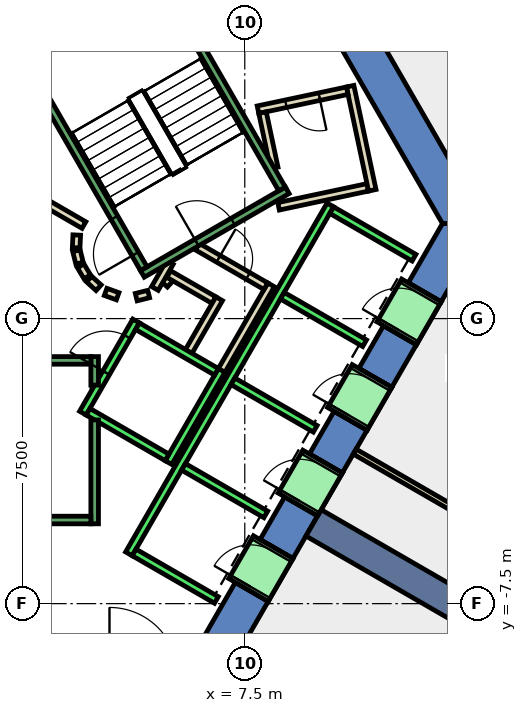
"""IFC4 building model, lengths in metres.
Left out: names, types, materials, properties, quantities, classifications, styles, units other than length and angle.
Written with IfcOpenShell. Run it as: python <this file> out.ifc"""

import sys

from ifc_helpers import new_model, si_unit, direction, frame, frame_2d, origin, place, context, subcontext, project, spatial, polyline, rectangle, outline, extrude, element, fill, save


model = new_model("IFC4")
c1 = context("Model", 3, precision=1e-05, world=origin(), true_north=direction((0.0, 1.0)))
c2 = subcontext(c1, "Body", "Model", "MODEL_VIEW")
j1 = project(units=[si_unit("LENGTHUNIT", "METRE"), si_unit("PLANEANGLEUNIT", "RADIAN")], contexts=[c1])
p1 = place(None, origin())
s1 = spatial("IfcSite", under=j1, at=p1, CompositionType="ELEMENT")
p2 = place(p1, origin())
s2 = spatial("IfcBuilding", under=s1, at=p2, CompositionType="ELEMENT")
p3 = place(p2, frame((0.0, 0.0, 9.0)))
s3 = spatial("IfcBuildingStorey", under=s2, at=p3, CompositionType="ELEMENT", Elevation=9.0)
p4 = place(p3, frame((0.0, 0.0, -0.45)))
e1 = element("IfcWall", 1, at=p4, inside=s3, PredefinedType="SHEAR", context=c2, shape_type="SweptSolid", body=[
    extrude(outline(polyline([(8.517, 11.748), (7.651, 11.248), (12.702, 2.5), (13.856, 2.5), (8.517, 11.748)])), origin(), (0.0, 0.0, 1.0), 6.0),
])
p5 = place(p3, frame((0.0, 0.0, -0.45)))
e2 = element("IfcWall", 2, at=p5, inside=s3, PredefinedType="SHEAR", context=c2, shape_type="SweptSolid", body=[
    extrude(outline(polyline([(8.117, -7.44), (7.252, -6.94), (6.351, -8.5), (6.928, -9.5), (8.117, -7.44)])), origin(), (0.0, 0.0, 1.0), 6.0),
])
p6 = place(p3, frame((0.0, 0.0, -0.45)))
e3 = element("IfcWall", 3, at=p6, inside=s3, PredefinedType="SHEAR", context=c2, shape_type="SweptSolid", body=[
    extrude(outline(polyline([(9.417, -5.189), (8.551, -4.689), (7.902, -5.814), (8.767, -6.314), (9.417, -5.189)])), origin(), (0.0, 0.0, 1.0), 6.0),
])
p7 = place(p3, frame((0.0, 0.0, -0.45)))
e4 = element("IfcWall", 4, at=p7, inside=s3, PredefinedType="SHEAR", context=c2, shape_type="SweptSolid", body=[
    extrude(outline(polyline([(10.717, -2.937), (9.851, -2.437), (9.201, -3.563), (10.067, -4.063), (10.717, -2.937)])), origin(), (0.0, 0.0, 1.0), 6.0),
])
p8 = place(p3, frame((0.0, 0.0, -0.45)))
e5 = element("IfcWall", 5, at=p8, inside=s3, PredefinedType="SHEAR", context=c2, shape_type="SweptSolid", body=[
    extrude(outline(polyline([(12.017, -0.686), (11.151, -0.186), (10.501, -1.311), (11.367, -1.811), (12.017, -0.686)])), origin(), (0.0, 0.0, 1.0), 6.0),
])
p9 = place(p3, frame((0.0, 0.0, -0.45)))
e6 = element("IfcWall", 6, at=p9, inside=s3, PredefinedType="SHEAR", context=c2, shape_type="SweptSolid", body=[
    extrude(outline(polyline([(11.801, 0.94), (12.667, 0.44), (13.856, 2.5), (12.702, 2.5), (11.801, 0.94)])), origin(), (0.0, 0.0, 1.0), 6.0),
])
p10 = place(p3, frame((0.0, 0.0, 3.6)))
e7 = element("IfcWall", 7, at=p10, inside=s3, PredefinedType="SHEAR", context=c2, shape_type="SweptSolid", body=[
    extrude(outline(polyline([(8.767, -6.314), (7.902, -5.814), (7.252, -6.94), (8.117, -7.44), (8.767, -6.314)])), origin(), (0.0, 0.0, 1.0), 1.95),
])
p11 = place(p3, frame((0.0, 0.0, 3.6)))
e8 = element("IfcWall", 8, at=p11, inside=s3, PredefinedType="SHEAR", context=c2, shape_type="SweptSolid", body=[
    extrude(outline(polyline([(10.067, -4.063), (9.201, -3.563), (8.551, -4.689), (9.417, -5.189), (10.067, -4.063)])), origin(), (0.0, 0.0, 1.0), 1.95),
])
p12 = place(p3, frame((0.0, 0.0, 3.6)))
e9 = element("IfcWall", 9, at=p12, inside=s3, PredefinedType="SHEAR", context=c2, shape_type="SweptSolid", body=[
    extrude(outline(polyline([(11.367, -1.811), (10.501, -1.311), (9.851, -2.437), (10.717, -2.937), (11.367, -1.811)])), origin(), (0.0, 0.0, 1.0), 1.95),
])
p13 = place(p3, frame((0.0, 0.0, 3.6)))
e10 = element("IfcWall", 10, at=p13, inside=s3, PredefinedType="SHEAR", context=c2, shape_type="SweptSolid", body=[
    extrude(outline(polyline([(12.667, 0.44), (11.801, 0.94), (11.151, -0.186), (12.017, -0.686), (12.667, 0.44)])), origin(), (0.0, 0.0, 1.0), 1.95),
])
p14 = place(p3, frame((9.31, -5.375, -0.45), z_axis=(0.0, 0.0, 1.0), x_axis=(0.866017533419, -0.500013631625, 0.0)))
e11 = element("IfcWall", 11, at=p14, inside=s3, PredefinedType="SHEAR", context=c2, shape_type="SweptSolid", body=[
    extrude(rectangle(XDim=9.0, YDim=0.8, at=frame_2d((4.5, 0.0))), origin(), (0.0, 0.0, 1.0), 6.0),
])
p15 = place(p3, frame((5.39, 0.898, 0.0), z_axis=(0.0, 0.0, 1.0), x_axis=(0.673828488714, 0.738887791073, 0.0)))
e12 = element("IfcWall", 12, at=p15, inside=s3, PredefinedType="PARTITIONING", context=c2, shape_type="SweptSolid", body=[
    extrude(rectangle(XDim=0.263, YDim=0.2, at=frame_2d((0.131, 0.0))), origin(), (0.0, 0.0, 1.0), 5.55),
])
p16 = place(p3, frame((5.499, 1.172, 0.0), z_axis=(0.0, 0.0, 1.0), x_axis=(0.866333505267, -0.499465972466, 0.0)))
e13 = element("IfcWall", 13, at=p16, inside=s3, PredefinedType="PARTITIONING", context=c2, shape_type="SweptSolid", body=[
    extrude(rectangle(XDim=1.374, YDim=0.2, at=frame_2d((0.687, 0.0))), origin(), (0.0, 0.0, 1.0), 5.55),
])
p17 = place(p3, frame((6.826, 0.522, 0.0), z_axis=(0.0, 0.0, 1.0), x_axis=(-0.500016722714, -0.866015748706, 0.0)))
e14 = element("IfcWall", 14, at=p17, inside=s3, PredefinedType="PARTITIONING", context=c2, shape_type="SweptSolid", body=[
    extrude(rectangle(XDim=1.7, YDim=0.2, at=frame_2d((0.85, 0.0))), origin(), (0.0, 0.0, 1.0), 5.55),
])
p18 = place(p3, frame((8.192, 0.888, 0.0), z_axis=(0.0, 0.0, 1.0), x_axis=(-0.499940625693, -0.866059680843, 0.0)))
e15 = element("IfcWall", 15, at=p18, inside=s3, PredefinedType="PARTITIONING", context=c2, shape_type="SweptSolid", body=[
    extrude(rectangle(XDim=2.68, YDim=0.2, at=frame_2d((1.34, 0.0))), origin(), (0.0, 0.0, 1.0), 5.55),
])
p19 = place(p3, frame((5.135, 0.793, 0.0), z_axis=(0.0, 0.0, 1.0), x_axis=(0.499526442893, 0.866298639529, 0.0)))
e16 = element("IfcWall", 16, at=p19, inside=s3, PredefinedType="PARTITIONING", context=c2, shape_type="SweptSolid", body=[
    extrude(rectangle(XDim=0.791, YDim=0.2, at=frame_2d((0.396, 0.0))), origin(), (0.0, 0.0, 1.0), 5.55),
])
p20 = place(p3, frame((6.25, 1.894, 0.0), z_axis=(0.0, 0.0, 1.0), x_axis=(0.866043184279, -0.499969202016, 0.0)))
e17 = element("IfcWall", 17, at=p20, inside=s3, PredefinedType="PARTITIONING", context=c2, shape_type="SweptSolid", body=[
    extrude(rectangle(XDim=2.084, YDim=0.2, at=frame_2d((1.042, 0.0))), origin(), (0.0, 0.0, 1.0), 5.55),
])
p21 = place(p20, frame((0.642, 0.0, 0.0)))
e18 = element("IfcOpeningElement", 18, at=p21, cuts=e17, PredefinedType="OPENING", context=c2, shape_type="SweptSolid", body=[
    extrude(rectangle(XDim=0.9, YDim=2.1, at=frame_2d((0.45, 1.05))), frame((0.0, 0.11, 0.0), z_axis=(0.0, -1.0, 0.0), x_axis=(1.0, 0.0, 0.0)), (0.0, 0.0, 1.0), 0.22),
])
p22 = place(p3, frame((8.389, 2.954, 0.0), z_axis=(0.0, 0.0, 1.0), x_axis=(0.978158333757, 0.207861189501, 0.0)))
e19 = element("IfcWall", 19, at=p22, inside=s3, PredefinedType="PARTITIONING", context=c2, shape_type="SweptSolid", body=[
    extrude(rectangle(XDim=2.4, YDim=0.2, at=frame_2d((1.2, 0.0))), origin(), (0.0, 0.0, 1.0), 5.55),
])
p23 = place(p3, frame((10.855, 3.376, 0.0), z_axis=(0.0, 0.0, 1.0), x_axis=(-0.207855627539, 0.978159515672, 0.0)))
e20 = element("IfcWall", 20, at=p23, inside=s3, PredefinedType="PARTITIONING", context=c2, shape_type="SweptSolid", body=[
    extrude(rectangle(XDim=2.8, YDim=0.2, at=frame_2d((1.4, 0.0))), origin(), (0.0, 0.0, 1.0), 5.55),
])
p24 = place(p3, frame((10.196, 5.996, 0.0), z_axis=(0.0, 0.0, 1.0), x_axis=(-0.978155232185, -0.207875784424, 0.0)))
e21 = element("IfcWall", 21, at=p24, inside=s3, PredefinedType="PARTITIONING", context=c2, shape_type="SweptSolid", body=[
    extrude(rectangle(XDim=2.401, YDim=0.2, at=frame_2d((1.2, 0.0))), origin(), (0.0, 0.0, 1.0), 5.55),
])
p25 = place(p24, frame((0.75, 0.0, 0.0)))
e22 = element("IfcOpeningElement", 22, at=p25, cuts=e21, PredefinedType="OPENING", context=c2, shape_type="SweptSolid", body=[
    extrude(rectangle(XDim=0.9, YDim=2.1, at=frame_2d((0.45, 1.05))), frame((0.0, 0.11, 0.0), z_axis=(0.0, -1.0, 0.0), x_axis=(1.0, 0.0, 0.0)), (0.0, 0.0, 1.0), 0.22),
])
p26 = place(p3, frame((7.967, 5.42, 0.0), z_axis=(0.0, 0.0, 1.0), x_axis=(0.207656532783, -0.978201801467, 0.0)))
e23 = element("IfcWall", 23, at=p26, inside=s3, PredefinedType="PARTITIONING", context=c2, shape_type="SweptSolid", body=[
    extrude(rectangle(XDim=1.487, YDim=0.2, at=frame_2d((0.744, 0.0))), origin(), (0.0, 0.0, 1.0), 5.55),
])
p27 = place(p3, frame((3.079, 2.199, 0.0), z_axis=(0.0, 0.0, 1.0), x_axis=(-0.047771483479, -0.998858290933, 0.0)))
e24 = element("IfcWall", 24, at=p27, inside=s3, PredefinedType="PARTITIONING", context=c2, shape_type="SweptSolid", body=[
    extrude(rectangle(XDim=0.337, YDim=0.2, at=frame_2d((0.169, 0.0))), origin(), (0.0, 0.0, 1.0), 5.55),
])
p28 = place(p3, frame((3.07, 1.786, 0.0), z_axis=(0.0, 0.0, 1.0), x_axis=(0.242705583207, -0.970099994784, 0.0)))
e25 = element("IfcWall", 25, at=p28, inside=s3, PredefinedType="PARTITIONING", context=c2, shape_type="SweptSolid", body=[
    extrude(rectangle(XDim=0.338, YDim=0.2, at=frame_2d((0.169, 0.0))), origin(), (0.0, 0.0, 1.0), 5.55),
])
for number, where, z_axis, x_axis in (
    (26, (3.182, 1.388, 0.0), (0.0, 0.0, 1.0), (0.512, -0.859, 0.0)),
    (27, (3.404, 1.039, 0.0), (0.0, 0.0, 1.0), (0.74, -0.672, 0.0)),
):
    element("IfcWall", number, at=place(p3, frame(where, z_axis=z_axis, x_axis=x_axis)), inside=s3, PredefinedType="PARTITIONING", context=c2, shape_type="SweptSolid", body=[
        extrude(rectangle(XDim=0.338, YDim=0.2, at=frame_2d((0.169, 0.0))), origin(), (0.0, 0.0, 1.0), 5.55),
    ])
p29 = place(p3, frame((3.838, 0.702, 0.0), z_axis=(0.0, 0.0, 1.0), x_axis=(0.941035081519, -0.338308993895, 0.0)))
e28 = element("IfcWall", 28, at=p29, inside=s3, PredefinedType="PARTITIONING", context=c2, shape_type="SweptSolid", body=[
    extrude(rectangle(XDim=0.337, YDim=0.2, at=frame_2d((0.168, 0.0))), origin(), (0.0, 0.0, 1.0), 5.55),
])
p30 = place(p3, frame((4.644, 0.564, 0.0), z_axis=(0.0, 0.0, 1.0), x_axis=(0.969929076366, 0.243387729394, 0.0)))
e29 = element("IfcWall", 29, at=p30, inside=s3, PredefinedType="PARTITIONING", context=c2, shape_type="SweptSolid", body=[
    extrude(rectangle(XDim=0.337, YDim=0.2, at=frame_2d((0.168, 0.0))), origin(), (0.0, 0.0, 1.0), 5.55),
])
p31 = place(p3, frame((2.012, 3.186, 0.0), z_axis=(0.0, 0.0, 1.0), x_axis=(0.865891012941, -0.500232699559, 0.0)))
e30 = element("IfcWall", 30, at=p31, inside=s3, PredefinedType="PARTITIONING", context=c2, shape_type="SweptSolid", body=[
    extrude(rectangle(XDim=1.449, YDim=0.2, at=frame_2d((0.725, 0.0))), origin(), (0.0, 0.0, 1.0), 5.55),
])
p32 = place(p3, frame((10.392, -3.5, 0.0), z_axis=(0.0, 0.0, 1.0), x_axis=(0.866033409894, -0.499986132754, 0.0)))
e31 = element("IfcWall", 31, at=p32, inside=s3, PredefinedType="PARTITIONING", context=c2, shape_type="SweptSolid", body=[
    extrude(rectangle(XDim=21.8, YDim=0.15, at=frame_2d((10.9, 0.0))), origin(), (0.0, 0.0, 1.0), 5.55),
])
p33 = place(p32, frame((10.08, 0.0, 0.0)))
e32 = element("IfcOpeningElement", 32, at=p33, cuts=e31, PredefinedType="OPENING", context=c2, shape_type="SweptSolid", body=[
    extrude(rectangle(XDim=1.8, YDim=2.1, at=frame_2d((0.9, 1.05))), frame((0.0, 0.085, 0.0), z_axis=(0.0, -1.0, 0.0), x_axis=(1.0, 0.0, 0.0)), (0.0, 0.0, 1.0), 0.17),
])
p34 = place(p3, frame((3.24, -2.488, 0.0), z_axis=(0.0, 0.0, 1.0), x_axis=(0.49994636267, 0.866056369097, 0.0)))
e33 = element("IfcWall", 33, at=p34, inside=s3, PredefinedType="STANDARD", context=c2, shape_type="SweptSolid", body=[
    extrude(rectangle(XDim=2.8, YDim=0.2, at=frame_2d((1.4, 0.0))), origin(), (0.0, 0.0, 1.0), 5.55),
])
p35 = place(p34, frame((1.225, 0.0, 0.0)))
e34 = element("IfcOpeningElement", 34, at=p35, cuts=e33, PredefinedType="OPENING", context=c2, shape_type="SweptSolid", body=[
    extrude(rectangle(XDim=1.1, YDim=2.1, at=frame_2d((0.55, 1.05))), frame((0.0, 0.11, 0.0), z_axis=(0.0, -1.0, 0.0), x_axis=(1.0, 0.0, 0.0)), (0.0, 0.0, 1.0), 0.22),
])
p36 = place(p3, frame((5.492, -3.788, 0.0), z_axis=(0.0, 0.0, 1.0), x_axis=(0.500011755427, 0.866018616679, 0.0)))
e35 = element("IfcWall", 35, at=p36, inside=s3, PredefinedType="STANDARD", context=c2, shape_type="SweptSolid", body=[
    extrude(rectangle(XDim=2.8, YDim=0.2, at=frame_2d((1.4, 0.0))), origin(), (0.0, 0.0, 1.0), 5.55),
])
p37 = place(p3, frame((3.377, -2.452, 0.0), z_axis=(0.0, 0.0, 1.0), x_axis=(0.865955154139, -0.50012165622, 0.0)))
e36 = element("IfcWall", 36, at=p37, inside=s3, PredefinedType="STANDARD", context=c2, shape_type="SweptSolid", body=[
    extrude(rectangle(XDim=2.4, YDim=0.2, at=frame_2d((1.2, 0.0))), origin(), (0.0, 0.0, 1.0), 5.55),
])
p38 = place(p3, frame((4.677, -0.2, 0.0), z_axis=(0.0, 0.0, 1.0), x_axis=(0.865973769406, -0.500089422704, 0.0)))
e37 = element("IfcWall", 37, at=p38, inside=s3, PredefinedType="STANDARD", context=c2, shape_type="SweptSolid", body=[
    extrude(rectangle(XDim=2.399, YDim=0.2, at=frame_2d((1.2, 0.0))), origin(), (0.0, 0.0, 1.0), 5.55),
])
p39 = place(p3, frame((4.451, -6.19, 0.0), z_axis=(0.0, 0.0, 1.0), x_axis=(0.50000090737, 0.866024879913, 0.0)))
e38 = element("IfcWall", 38, at=p39, inside=s3, PredefinedType="STANDARD", context=c2, shape_type="SweptSolid", body=[
    extrude(rectangle(XDim=10.6, YDim=0.2, at=frame_2d((5.3, 0.0))), origin(), (0.0, 0.0, 1.0), 5.55),
])
for number, where, z_axis, x_axis in (
    (39, (4.588, -6.153, 0.0), (0.0, 0.0, 1.0), (0.866, -0.5, 0.0)),
    (40, (5.888, -3.902, 0.0), (0.0, 0.0, 1.0), (0.866, -0.5, 0.0)),
    (41, (7.188, -1.65, 0.0), (0.0, 0.0, 1.0), (0.866, -0.5, 0.0)),
    (42, (8.488, 0.602, 0.0), (0.0, 0.0, 1.0), (0.866, -0.5, 0.0)),
):
    element("IfcWall", number, at=place(p3, frame(where, z_axis=z_axis, x_axis=x_axis)), inside=s3, PredefinedType="STANDARD", context=c2, shape_type="SweptSolid", body=[
        extrude(rectangle(XDim=2.5, YDim=0.2, at=frame_2d((1.25, 0.0))), origin(), (0.0, 0.0, 1.0), 5.55),
    ])
p40 = place(p3, frame((9.788, 2.853, 0.0), z_axis=(0.0, 0.0, 1.0), x_axis=(0.865998541277, -0.500046524342, 0.0)))
e43 = element("IfcWall", 43, at=p40, inside=s3, PredefinedType="STANDARD", context=c2, shape_type="SweptSolid", body=[
    extrude(rectangle(XDim=2.5, YDim=0.2, at=frame_2d((1.25, 0.0))), origin(), (0.0, 0.0, 1.0), 5.55),
])
p41 = place(p3, frame((7.598, -7.14, 0.0), z_axis=(0.0, 0.0, 1.0), x_axis=(0.500362116554, 0.865816234728, 0.0)))
e44 = element("IfcWall", 44, at=p41, inside=s3, PredefinedType="STANDARD", context=c2, shape_type="SweptSolid", body=[
    extrude(rectangle(XDim=1.299, YDim=1.2, at=frame_2d((0.65, 0.0))), origin(), (0.0, 0.0, 1.0), 2.4),
])
p42 = place(p41, frame((0.1, 0.0, 0.0)))
e45 = element("IfcOpeningElement", 45, at=p42, cuts=e44, PredefinedType="OPENING", context=c2, shape_type="SweptSolid", body=[
    extrude(rectangle(XDim=1.1, YDim=2.3, at=frame_2d((0.55, 1.15))), frame((0.0, 0.61, 0.0), z_axis=(0.0, -1.0, 0.0), x_axis=(1.0, 0.0, 0.0)), (0.0, 0.0, 1.0), 1.22),
])
p43 = place(p3, frame((8.898, -4.889, 0.0), z_axis=(0.0, 0.0, 1.0), x_axis=(0.500036693733, 0.866004217611, 0.0)))
e46 = element("IfcWall", 46, at=p43, inside=s3, PredefinedType="STANDARD", context=c2, shape_type="SweptSolid", body=[
    extrude(rectangle(XDim=1.3, YDim=1.2, at=frame_2d((0.65, 0.0))), origin(), (0.0, 0.0, 1.0), 2.4),
])
p44 = place(p43, frame((0.1, 0.0, 0.0)))
e47 = element("IfcOpeningElement", 47, at=p44, cuts=e46, PredefinedType="OPENING", context=c2, shape_type="SweptSolid", body=[
    extrude(rectangle(XDim=1.1, YDim=2.3, at=frame_2d((0.55, 1.15))), frame((0.0, 0.61, 0.0), z_axis=(0.0, -1.0, 0.0), x_axis=(1.0, 0.0, 0.0)), (0.0, 0.0, 1.0), 1.22),
])
p45 = place(p3, frame((10.198, -2.637, 0.0), z_axis=(0.0, 0.0, 1.0), x_axis=(0.49989585183, 0.866085525409, 0.0)))
e48 = element("IfcWall", 48, at=p45, inside=s3, PredefinedType="STANDARD", context=c2, shape_type="SweptSolid", body=[
    extrude(rectangle(XDim=1.3, YDim=1.2, at=frame_2d((0.65, 0.0))), origin(), (0.0, 0.0, 1.0), 2.4),
])
p46 = place(p45, frame((0.1, 0.0, 0.0)))
e49 = element("IfcOpeningElement", 49, at=p46, cuts=e48, PredefinedType="OPENING", context=c2, shape_type="SweptSolid", body=[
    extrude(rectangle(XDim=1.1, YDim=2.3, at=frame_2d((0.55, 1.15))), frame((0.0, 0.61, 0.0), z_axis=(0.0, -1.0, 0.0), x_axis=(1.0, 0.0, 0.0)), (0.0, 0.0, 1.0), 1.22),
])
p47 = place(p3, frame((11.498, -0.385, 0.0), z_axis=(0.0, 0.0, 1.0), x_axis=(0.500221244143, 0.865897630733, 0.0)))
e50 = element("IfcWall", 50, at=p47, inside=s3, PredefinedType="STANDARD", context=c2, shape_type="SweptSolid", body=[
    extrude(rectangle(XDim=1.299, YDim=1.2, at=frame_2d((0.65, 0.0))), origin(), (0.0, 0.0, 1.0), 2.4),
])
p48 = place(p47, frame((0.1, 0.0, 0.0)))
e51 = element("IfcOpeningElement", 51, at=p48, cuts=e50, PredefinedType="OPENING", context=c2, shape_type="SweptSolid", body=[
    extrude(rectangle(XDim=1.1, YDim=2.3, at=frame_2d((0.55, 1.15))), frame((0.0, 0.61, 0.0), z_axis=(0.0, -1.0, 0.0), x_axis=(1.0, 0.0, 0.0)), (0.0, 0.0, 1.0), 1.22),
])
p49 = place(p3, frame((3.55, -2.667, 0.0), z_axis=(0.0, 0.0, 1.0), x_axis=(0.0, -1.0, 0.0)))
e52 = element("IfcWall", 52, at=p49, inside=s3, PredefinedType="STANDARD", context=c2, shape_type="SweptSolid", body=[
    extrude(rectangle(XDim=2.733, YDim=0.2, at=frame_2d((1.366, 0.0))), origin(), (0.0, 0.0, 1.0), 5.55),
])
p50 = place(p3, frame((3.55, -1.0, 0.0), z_axis=(0.0, 0.0, 1.0), x_axis=(0.0, -1.0, 0.0)))
e53 = element("IfcWall", 53, at=p50, inside=s3, PredefinedType="STANDARD", context=c2, shape_type="SweptSolid", body=[
    extrude(rectangle(XDim=0.751, YDim=0.2, at=frame_2d((0.375, 0.0))), origin(), (0.0, 0.0, 1.0), 5.55),
])
p51 = place(p3, frame((-3.45, -1.1, 0.0), z_axis=(0.0, 0.0, 1.0), x_axis=(1.0, 0.0, 0.0)))
e54 = element("IfcWall", 54, at=p51, inside=s3, PredefinedType="STANDARD", context=c2, shape_type="SweptSolid", body=[
    extrude(rectangle(XDim=6.9, YDim=0.2, at=frame_2d((3.45, 0.0))), origin(), (0.0, 0.0, 1.0), 5.55),
])
p52 = place(p51, frame((0.45, 0.0, 0.0)))
e55 = element("IfcOpeningElement", 55, at=p52, cuts=e54, PredefinedType="OPENING", context=c2, shape_type="SweptSolid", body=[
    extrude(rectangle(XDim=1.1, YDim=2.2, at=frame_2d((0.55, 1.1))), frame((0.0, 0.11, 0.0), z_axis=(0.0, -1.0, 0.0), x_axis=(1.0, 0.0, 0.0)), (0.0, 0.0, 1.0), 0.22),
])
p53 = place(p3, frame((-3.45, -5.3, 0.0), z_axis=(0.0, 0.0, 1.0), x_axis=(1.0, 0.0, 0.0)))
e56 = element("IfcWall", 56, at=p53, inside=s3, PredefinedType="STANDARD", context=c2, shape_type="SweptSolid", body=[
    extrude(rectangle(XDim=6.9, YDim=0.2, at=frame_2d((3.45, 0.0))), origin(), (0.0, 0.0, 1.0), 5.55),
])
p54 = place(p3, frame((4.806, 1.176, 0.0), z_axis=(0.0, 0.0, 1.0), x_axis=(0.866059941101, 0.499940174841, 0.0)))
e57 = element("IfcWall", 57, at=p54, inside=s3, PredefinedType="STANDARD", context=c2, shape_type="SweptSolid", body=[
    extrude(rectangle(XDim=4.4, YDim=0.2, at=frame_2d((2.2, 0.0))), origin(), (0.0, 0.0, 1.0), 5.55),
])
p55 = place(p54, frame((1.65, 0.0, 0.0)))
e58 = element("IfcOpeningElement", 58, at=p55, cuts=e57, PredefinedType="OPENING", context=c2, shape_type="SweptSolid", body=[
    extrude(rectangle(XDim=1.1, YDim=2.2, at=frame_2d((0.55, 1.1))), frame((0.0, 0.11, 0.0), z_axis=(0.0, -1.0, 0.0), x_axis=(1.0, 0.0, 0.0)), (0.0, 0.0, 1.0), 0.22),
])
p56 = place(p3, frame((4.843, 1.312, 0.0), z_axis=(0.0, 0.0, 1.0), x_axis=(-0.499963383562, 0.866046543262, 0.0)))
e59 = element("IfcWall", 59, at=p56, inside=s3, PredefinedType="STANDARD", context=c2, shape_type="SweptSolid", body=[
    extrude(rectangle(XDim=6.9, YDim=0.2, at=frame_2d((3.45, 0.0))), origin(), (0.0, 0.0, 1.0), 5.55),
])
p57 = place(p56, frame((0.45, 0.0, 0.0)))
e60 = element("IfcOpeningElement", 60, at=p57, cuts=e59, PredefinedType="OPENING", context=c2, shape_type="SweptSolid", body=[
    extrude(rectangle(XDim=1.1, YDim=2.2, at=frame_2d((0.55, 1.1))), frame((0.0, 0.11, 0.0), z_axis=(0.0, -1.0, 0.0), x_axis=(1.0, 0.0, 0.0)), (0.0, 0.0, 1.0), 0.22),
])
p58 = place(p3, frame((8.48, 3.412, 0.0), z_axis=(0.0, 0.0, 1.0), x_axis=(-0.499978703459, 0.866037698999, 0.0)))
e61 = element("IfcWall", 61, at=p58, inside=s3, PredefinedType="STANDARD", context=c2, shape_type="SweptSolid", body=[
    extrude(rectangle(XDim=6.9, YDim=0.2, at=frame_2d((3.45, 0.0))), origin(), (0.0, 0.0, 1.0), 5.55),
])
p59 = place(p21, origin())
e62 = element("IfcDoor", 62, at=p59, inside=s3, OperationType="SINGLE_SWING_LEFT", PredefinedType="DOOR", context=c2, shape_type="SweptSolid", body=[
    extrude(rectangle(XDim=0.9, YDim=2.1, at=frame_2d((0.45, 1.05))), frame((0.0, 0.025, 0.0), z_axis=(0.0, -1.0, 0.0), x_axis=(1.0, 0.0, 0.0)), (0.0, 0.0, 1.0), 0.05),
])
fill(e18, e62)
p60 = place(p25, origin())
e63 = element("IfcDoor", 63, at=p60, inside=s3, OperationType="SINGLE_SWING_LEFT", PredefinedType="DOOR", context=c2, shape_type="SweptSolid", body=[
    extrude(rectangle(XDim=0.9, YDim=2.1, at=frame_2d((0.45, 1.05))), frame((0.0, 0.025, 0.0), z_axis=(0.0, -1.0, 0.0), x_axis=(1.0, 0.0, 0.0)), (0.0, 0.0, 1.0), 0.05),
])
fill(e22, e63)
p61 = place(p42, origin())
e64 = element("IfcDoor", 64, at=p61, inside=s3, OperationType="SLIDING_TO_LEFT", PredefinedType="DOOR", context=c2, shape_type="SweptSolid", body=[
    extrude(rectangle(XDim=1.1, YDim=2.3, at=frame_2d((0.55, 1.15))), frame((0.0, 0.025, 0.0), z_axis=(0.0, -1.0, 0.0), x_axis=(1.0, 0.0, 0.0)), (0.0, 0.0, 1.0), 0.05),
])
fill(e45, e64)
p62 = place(p44, origin())
e65 = element("IfcDoor", 65, at=p62, inside=s3, OperationType="SLIDING_TO_LEFT", PredefinedType="DOOR", context=c2, shape_type="SweptSolid", body=[
    extrude(rectangle(XDim=1.1, YDim=2.3, at=frame_2d((0.55, 1.15))), frame((0.0, 0.025, 0.0), z_axis=(0.0, -1.0, 0.0), x_axis=(1.0, 0.0, 0.0)), (0.0, 0.0, 1.0), 0.05),
])
fill(e47, e65)
p63 = place(p46, origin())
e66 = element("IfcDoor", 66, at=p63, inside=s3, OperationType="SLIDING_TO_LEFT", PredefinedType="DOOR", context=c2, shape_type="SweptSolid", body=[
    extrude(rectangle(XDim=1.1, YDim=2.3, at=frame_2d((0.55, 1.15))), frame((0.0, 0.025, 0.0), z_axis=(0.0, -1.0, 0.0), x_axis=(1.0, 0.0, 0.0)), (0.0, 0.0, 1.0), 0.05),
])
fill(e49, e66)
p64 = place(p48, origin())
e67 = element("IfcDoor", 67, at=p64, inside=s3, OperationType="SLIDING_TO_LEFT", PredefinedType="DOOR", context=c2, shape_type="SweptSolid", body=[
    extrude(rectangle(XDim=1.1, YDim=2.3, at=frame_2d((0.55, 1.15))), frame((0.0, 0.025, 0.0), z_axis=(0.0, -1.0, 0.0), x_axis=(1.0, 0.0, 0.0)), (0.0, 0.0, 1.0), 0.05),
])
fill(e51, e67)
p65 = place(p35, origin())
e68 = element("IfcDoor", 68, at=p65, inside=s3, OperationType="SLIDING_TO_LEFT", PredefinedType="DOOR", context=c2, shape_type="SweptSolid", body=[
    extrude(rectangle(XDim=1.1, YDim=2.1, at=frame_2d((0.55, 1.05))), frame((0.0, 0.025, 0.0), z_axis=(0.0, -1.0, 0.0), x_axis=(1.0, 0.0, 0.0)), (0.0, 0.0, 1.0), 0.05),
])
fill(e34, e68)
p66 = place(p57, origin())
e69 = element("IfcDoor", 69, at=p66, inside=s3, OperationType="SINGLE_SWING_LEFT", PredefinedType="DOOR", context=c2, shape_type="SweptSolid", body=[
    extrude(rectangle(XDim=1.1, YDim=2.2, at=frame_2d((0.55, 1.1))), frame((0.0, 0.025, 0.0), z_axis=(0.0, -1.0, 0.0), x_axis=(1.0, 0.0, 0.0)), (0.0, 0.0, 1.0), 0.05),
])
fill(e60, e69)
p67 = place(p55, origin())
e70 = element("IfcDoor", 70, at=p67, inside=s3, OperationType="SINGLE_SWING_LEFT", PredefinedType="DOOR", context=c2, shape_type="SweptSolid", body=[
    extrude(rectangle(XDim=1.1, YDim=2.2, at=frame_2d((0.55, 1.1))), frame((0.0, 0.025, 0.0), z_axis=(0.0, -1.0, 0.0), x_axis=(1.0, 0.0, 0.0)), (0.0, 0.0, 1.0), 0.05),
])
fill(e58, e70)
save(model, sys.argv[1])
